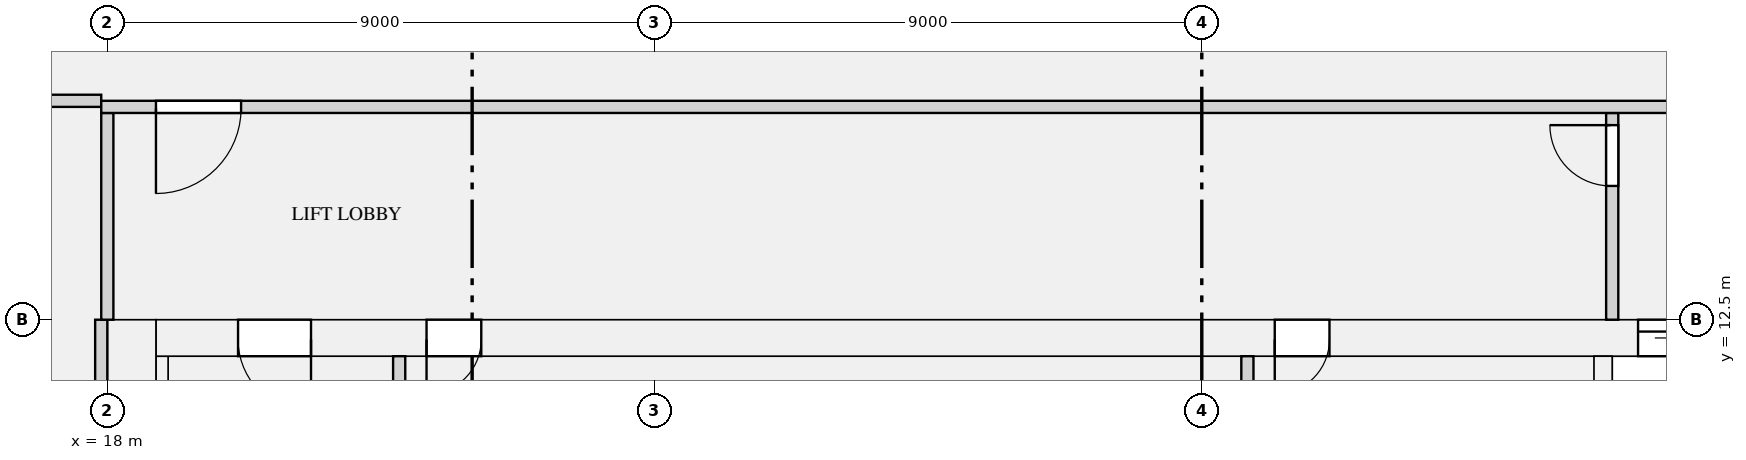
"""IFC4 building model, lengths in metres.
Left out: names, types, materials, properties, quantities, classifications, styles, units other than length and angle.
Written with IfcOpenShell. Run it as: python <this file> out.ifc"""

import sys

from ifc_helpers import new_model, si_unit, direction, frame, frame_2d, origin, place, context, subcontext, project, spatial, rectangle, extrude, element, fill, save


model = new_model("IFC4")
c1 = context("Model", 3, precision=1e-05, world=origin(), true_north=direction((0.0, 1.0)))
c2 = subcontext(c1, "Body", "Model", "MODEL_VIEW")
j1 = project(units=[si_unit("LENGTHUNIT", "METRE"), si_unit("PLANEANGLEUNIT", "RADIAN")], contexts=[c1])
p1 = place(None, origin())
s1 = spatial("IfcSite", under=j1, at=p1, CompositionType="ELEMENT")
p2 = place(p1, origin())
s2 = spatial("IfcBuilding", under=s1, at=p2, CompositionType="ELEMENT")
p3 = place(p2, frame((0.0, 0.0, 137.1)))
s3 = spatial("IfcBuildingStorey", under=s2, at=p3, CompositionType="ELEMENT", Elevation=137.1)
p4 = place(p3, frame((18.4, 0.0, 0.0), z_axis=(0.0, 0.0, 1.0), x_axis=(0.0, 1.0, 0.0)))
e1 = element("IfcWall", 1, at=p4, inside=s3, PredefinedType="SHEAR", context=c2, shape_type="SweptSolid", body=[
    extrude(rectangle(XDim=12.5, YDim=0.8, at=frame_2d((6.25, 0.0))), origin(), (0.0, 0.0, 1.0), 4.2),
])
p5 = place(p3, frame((18.8, 12.2, 0.0), z_axis=(0.0, 0.0, 1.0), x_axis=(1.0, 0.0, 0.0)))
e2 = element("IfcWall", 2, at=p5, inside=s3, PredefinedType="SHEAR", context=c2, shape_type="SweptSolid", body=[
    extrude(rectangle(XDim=34.4, YDim=0.6, at=frame_2d((17.2, 0.0))), origin(), (0.0, 0.0, 1.0), 4.2),
])
p6 = place(p5, frame((24.375, 0.0, 0.0)))
e3 = element("IfcOpeningElement", 3, at=p6, cuts=e2, PredefinedType="OPENING", context=c2, shape_type="SweptSolid", body=[
    extrude(rectangle(XDim=1.1, YDim=2.1, at=frame_2d((0.55, 1.05))), frame((0.0, 0.31, 0.0), z_axis=(0.0, -1.0, 0.0), x_axis=(1.0, 0.0, 0.0)), (0.0, 0.0, 1.0), 0.62),
])
p7 = place(p5, frame((26.625, 0.0, 0.0)))
e4 = element("IfcOpeningElement", 4, at=p7, cuts=e2, PredefinedType="OPENING", context=c2, shape_type="SweptSolid", body=[
    extrude(rectangle(XDim=1.1, YDim=2.1, at=frame_2d((0.55, 1.05))), frame((0.0, 0.31, 0.0), z_axis=(0.0, -1.0, 0.0), x_axis=(1.0, 0.0, 0.0)), (0.0, 0.0, 1.0), 0.62),
])
p8 = place(p5, frame((28.875, 0.0, 0.0)))
e5 = element("IfcOpeningElement", 5, at=p8, cuts=e2, PredefinedType="OPENING", context=c2, shape_type="SweptSolid", body=[
    extrude(rectangle(XDim=1.1, YDim=2.1, at=frame_2d((0.55, 1.05))), frame((0.0, 0.31, 0.0), z_axis=(0.0, -1.0, 0.0), x_axis=(1.0, 0.0, 0.0)), (0.0, 0.0, 1.0), 0.62),
])
p9 = place(p5, frame((18.4, 0.0, 0.0)))
e6 = element("IfcOpeningElement", 6, at=p9, cuts=e2, PredefinedType="OPENING", context=c2, shape_type="SweptSolid", body=[
    extrude(rectangle(XDim=0.9, YDim=2.1, at=frame_2d((0.45, 1.05))), frame((0.0, 0.31, 0.0), z_axis=(0.0, -1.0, 0.0), x_axis=(1.0, 0.0, 0.0)), (0.0, 0.0, 1.0), 0.62),
])
p10 = place(p5, frame((4.45, 0.0, 0.0)))
e7 = element("IfcOpeningElement", 7, at=p10, cuts=e2, PredefinedType="OPENING", context=c2, shape_type="SweptSolid", body=[
    extrude(rectangle(XDim=0.9, YDim=2.1, at=frame_2d((0.45, 1.05))), frame((0.0, 0.31, 0.0), z_axis=(0.0, -1.0, 0.0), x_axis=(1.0, 0.0, 0.0)), (0.0, 0.0, 1.0), 0.62),
])
p11 = place(p5, frame((1.35, 0.0, 0.0)))
e8 = element("IfcOpeningElement", 8, at=p11, cuts=e2, PredefinedType="OPENING", context=c2, shape_type="SweptSolid", body=[
    extrude(rectangle(XDim=1.2, YDim=2.1, at=frame_2d((0.6, 1.05))), frame((0.0, 0.31, 0.0), z_axis=(0.0, -1.0, 0.0), x_axis=(1.0, 0.0, 0.0)), (0.0, 0.0, 1.0), 0.62),
])
p12 = place(p5, frame((31.85, 0.0, 0.0)))
e9 = element("IfcOpeningElement", 9, at=p12, cuts=e2, PredefinedType="OPENING", context=c2, shape_type="SweptSolid", body=[
    extrude(rectangle(XDim=1.2, YDim=2.1, at=frame_2d((0.6, 1.05))), frame((0.0, 0.31, 0.0), z_axis=(0.0, -1.0, 0.0), x_axis=(1.0, 0.0, 0.0)), (0.0, 0.0, 1.0), 0.62),
])
p13 = place(p3, frame((18.9, 1.0, 0.0), z_axis=(0.0, 0.0, 1.0), x_axis=(0.0, 1.0, 0.0)))
e10 = element("IfcWall", 10, at=p13, inside=s3, PredefinedType="SHEAR", context=c2, shape_type="SweptSolid", body=[
    extrude(rectangle(XDim=10.9, YDim=0.2, at=frame_2d((5.45, 0.0))), origin(), (0.0, 0.0, 1.0), 4.2),
])
p14 = place(p3, frame((42.6, 8.25, 0.0), z_axis=(0.0, 0.0, 1.0), x_axis=(0.0, 1.0, 0.0)))
e11 = element("IfcWall", 11, at=p14, inside=s3, PredefinedType="SHEAR", context=c2, shape_type="SweptSolid", body=[
    extrude(rectangle(XDim=3.65, YDim=0.3, at=frame_2d((1.825, 0.0))), origin(), (0.0, 0.0, 1.0), 4.2),
])
for number, where, z_axis, x_axis in (
    (12, (22.8, 9.75, 0.0), (0.0, 0.0, 1.0), (0.0, 1.0, 0.0)),
    (13, (36.75, 9.75, 0.0), (0.0, 0.0, 1.0), (0.0, 1.0, 0.0)),
):
    element("IfcWall", number, at=place(p3, frame(where, z_axis=z_axis, x_axis=x_axis)), inside=s3, PredefinedType="PARTITIONING", context=c2, shape_type="SweptSolid", body=[
        extrude(rectangle(XDim=2.15, YDim=0.2, at=frame_2d((1.075, 0.0))), origin(), (0.0, 0.0, 1.0), 3.7),
    ])
p15 = place(p3, frame((18.0, 12.5, 0.0), z_axis=(0.0, 0.0, 1.0), x_axis=(0.0, 1.0, 0.0)))
e14 = element("IfcWall", 14, at=p15, inside=s3, PredefinedType="PARTITIONING", context=c2, shape_type="SweptSolid", body=[
    extrude(rectangle(XDim=3.4, YDim=0.2, at=frame_2d((1.7, 0.0))), origin(), (0.0, 0.0, 1.0), 3.7),
])
p16 = place(p3, frame((42.75, 12.5, 0.0), z_axis=(0.0, 0.0, 1.0), x_axis=(0.0, 1.0, 0.0)))
e15 = element("IfcWall", 15, at=p16, inside=s3, PredefinedType="PARTITIONING", context=c2, shape_type="SweptSolid", body=[
    extrude(rectangle(XDim=3.4, YDim=0.2, at=frame_2d((1.7, 0.0))), origin(), (0.0, 0.0, 1.0), 3.7),
])
p17 = place(p16, frame((2.2, 0.0, 0.0)))
e16 = element("IfcOpeningElement", 16, at=p17, cuts=e15, PredefinedType="OPENING", context=c2, shape_type="SweptSolid", body=[
    extrude(rectangle(XDim=1.0, YDim=2.1, at=frame_2d((0.5, 1.05))), frame((0.0, 0.11, 0.0), z_axis=(0.0, -1.0, 0.0), x_axis=(1.0, 0.0, 0.0)), (0.0, 0.0, 1.0), 0.22),
])
p18 = place(p3, frame((17.9, 16.0, 0.0), z_axis=(0.0, 0.0, 1.0), x_axis=(1.0, 0.0, 0.0)))
e17 = element("IfcWall", 17, at=p18, inside=s3, PredefinedType="PARTITIONING", context=c2, shape_type="SweptSolid", body=[
    extrude(rectangle(XDim=36.2, YDim=0.2, at=frame_2d((18.1, 0.0))), origin(), (0.0, 0.0, 1.0), 3.7),
])
p19 = place(p18, frame((0.9, 0.0, 0.0)))
e18 = element("IfcOpeningElement", 18, at=p19, cuts=e17, PredefinedType="OPENING", context=c2, shape_type="SweptSolid", body=[
    extrude(rectangle(XDim=1.4, YDim=2.1, at=frame_2d((0.7, 1.05))), frame((0.0, 0.11, 0.0), z_axis=(0.0, -1.0, 0.0), x_axis=(1.0, 0.0, 0.0)), (0.0, 0.0, 1.0), 0.22),
])
p20 = place(p18, frame((33.9, 0.0, 0.0)))
e19 = element("IfcOpeningElement", 19, at=p20, cuts=e17, PredefinedType="OPENING", context=c2, shape_type="SweptSolid", body=[
    extrude(rectangle(XDim=1.4, YDim=2.1, at=frame_2d((0.7, 1.05))), frame((0.0, 0.11, 0.0), z_axis=(0.0, -1.0, 0.0), x_axis=(1.0, 0.0, 0.0)), (0.0, 0.0, 1.0), 0.22),
])
p21 = place(p3, frame((7.55, 16.1, 0.0), z_axis=(0.0, 0.0, 1.0), x_axis=(1.0, 0.0, 0.0)))
e20 = element("IfcWall", 20, at=p21, inside=s3, PredefinedType="PARTITIONING", context=c2, shape_type="SweptSolid", body=[
    extrude(rectangle(XDim=10.35, YDim=0.2, at=frame_2d((5.175, 0.0))), origin(), (0.0, 0.0, 1.0), 3.7),
])
p22 = place(p21, frame((3.3, 0.0, 0.0)))
e21 = element("IfcOpeningElement", 21, at=p22, cuts=e20, PredefinedType="OPENING", context=c2, shape_type="SweptSolid", body=[
    extrude(rectangle(XDim=1.8, YDim=2.1, at=frame_2d((0.9, 1.05))), frame((0.0, 0.11, 0.0), z_axis=(0.0, -1.0, 0.0), x_axis=(1.0, 0.0, 0.0)), (0.0, 0.0, 1.0), 0.22),
])
p23 = place(p21, frame((8.15, 0.0, 0.0)))
e22 = element("IfcOpeningElement", 22, at=p23, cuts=e20, PredefinedType="OPENING", context=c2, shape_type="SweptSolid", body=[
    extrude(rectangle(XDim=1.0, YDim=2.1, at=frame_2d((0.5, 1.05))), frame((0.0, 0.11, 0.0), z_axis=(0.0, -1.0, 0.0), x_axis=(1.0, 0.0, 0.0)), (0.0, 0.0, 1.0), 0.22),
])
p24 = place(p3, frame((17.9, 0.75, 0.0), z_axis=(0.0, 0.0, 1.0), x_axis=(0.0, 1.0, 0.0)))
e23 = element("IfcWall", 23, at=p24, inside=s3, PredefinedType="PARTITIONING", context=c2, shape_type="SweptSolid", body=[
    extrude(rectangle(XDim=11.75, YDim=0.2, at=frame_2d((5.875, 0.0))), origin(), (0.0, 0.0, 1.0), 3.7),
])
p25 = place(p6, origin())
e24 = element("IfcDoor", 24, at=p25, inside=s3, OperationType="DOUBLE_DOOR_SLIDING", PredefinedType="DOOR", context=c2, shape_type="SweptSolid", body=[
    extrude(rectangle(XDim=1.1, YDim=2.1, at=frame_2d((0.55, 1.05))), frame((0.0, 0.025, 0.0), z_axis=(0.0, -1.0, 0.0), x_axis=(1.0, 0.0, 0.0)), (0.0, 0.0, 1.0), 0.05),
])
fill(e3, e24)
p26 = place(p9, frame((0.9, 0.0, 0.0), z_axis=(0.0, 0.0, 1.0), x_axis=(-1.0, 0.0, 0.0)))
e25 = element("IfcDoor", 25, at=p26, inside=s3, OperationType="SINGLE_SWING_RIGHT", PredefinedType="DOOR", context=c2, shape_type="SweptSolid", body=[
    extrude(rectangle(XDim=0.9, YDim=2.1, at=frame_2d((0.45, 1.05))), frame((0.0, 0.025, 0.0), z_axis=(0.0, -1.0, 0.0), x_axis=(1.0, 0.0, 0.0)), (0.0, 0.0, 1.0), 0.05),
])
fill(e6, e25)
p27 = place(p10, frame((0.9, 0.0, 0.0), z_axis=(0.0, 0.0, 1.0), x_axis=(-1.0, 0.0, 0.0)))
e26 = element("IfcDoor", 26, at=p27, inside=s3, OperationType="SINGLE_SWING_RIGHT", PredefinedType="DOOR", context=c2, shape_type="SweptSolid", body=[
    extrude(rectangle(XDim=0.9, YDim=2.1, at=frame_2d((0.45, 1.05))), frame((0.0, 0.025, 0.0), z_axis=(0.0, -1.0, 0.0), x_axis=(1.0, 0.0, 0.0)), (0.0, 0.0, 1.0), 0.05),
])
fill(e7, e26)
p28 = place(p11, frame((1.2, 0.0, 0.0), z_axis=(0.0, 0.0, 1.0), x_axis=(-1.0, 0.0, 0.0)))
e27 = element("IfcDoor", 27, at=p28, inside=s3, OperationType="SINGLE_SWING_LEFT", PredefinedType="DOOR", context=c2, shape_type="SweptSolid", body=[
    extrude(rectangle(XDim=1.2, YDim=2.1, at=frame_2d((0.6, 1.05))), frame((0.0, 0.025, 0.0), z_axis=(0.0, -1.0, 0.0), x_axis=(1.0, 0.0, 0.0)), (0.0, 0.0, 1.0), 0.05),
])
fill(e8, e27)
p29 = place(p17, origin())
e28 = element("IfcDoor", 28, at=p29, inside=s3, OperationType="SINGLE_SWING_RIGHT", PredefinedType="DOOR", context=c2, shape_type="SweptSolid", body=[
    extrude(rectangle(XDim=1.0, YDim=2.1, at=frame_2d((0.5, 1.05))), frame((0.0, 0.025, 0.0), z_axis=(0.0, -1.0, 0.0), x_axis=(1.0, 0.0, 0.0)), (0.0, 0.0, 1.0), 0.05),
])
fill(e16, e28)
p30 = place(p19, frame((1.4, 0.0, 0.0), z_axis=(0.0, 0.0, 1.0), x_axis=(-1.0, 0.0, 0.0)))
e29 = element("IfcDoor", 29, at=p30, inside=s3, OperationType="SINGLE_SWING_RIGHT", PredefinedType="DOOR", context=c2, shape_type="SweptSolid", body=[
    extrude(rectangle(XDim=1.4, YDim=2.1, at=frame_2d((0.7, 1.05))), frame((0.0, 0.025, 0.0), z_axis=(0.0, -1.0, 0.0), x_axis=(1.0, 0.0, 0.0)), (0.0, 0.0, 1.0), 0.05),
])
fill(e18, e29)
save(model, sys.argv[1])
